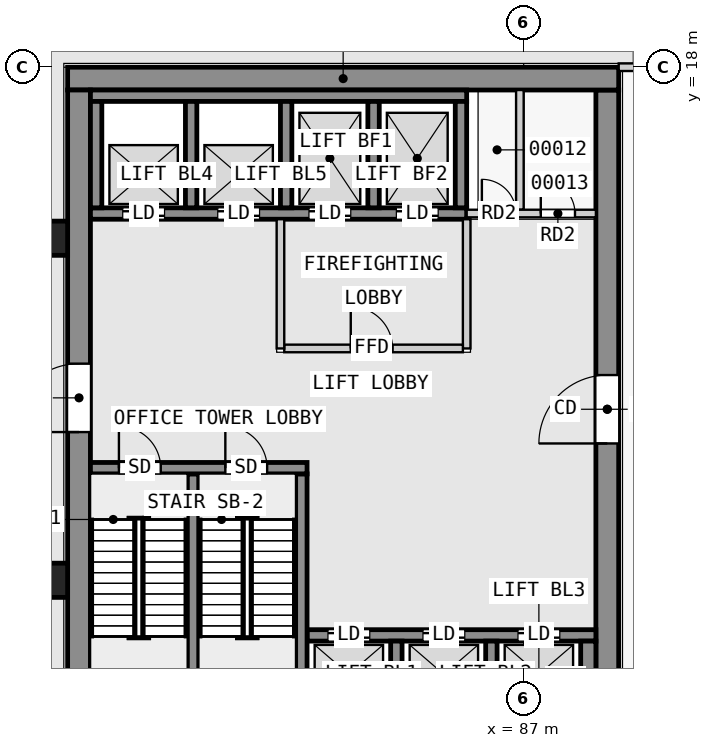
"""IFC4 building model, lengths in metres.
Left out: names, types, materials, properties, quantities, classifications, styles, units other than length and angle.
Written with IfcOpenShell. Run it as: python <this file> out.ifc"""

import sys

from ifc_helpers import new_model, si_unit, direction, frame, frame_2d, origin, origin_2d, place, context, subcontext, project, spatial, rectangle, extrude, element, fill, save


model = new_model("IFC4")
c1 = context("Model", 3, precision=1e-05, world=origin(), true_north=direction((0.0, 1.0)))
c2 = subcontext(c1, "Body", "Model", "MODEL_VIEW")
j1 = project(units=[si_unit("LENGTHUNIT", "METRE"), si_unit("PLANEANGLEUNIT", "RADIAN")], contexts=[c1])
p1 = place(None, origin())
s1 = spatial("IfcSite", under=j1, at=p1, CompositionType="ELEMENT")
p2 = place(p1, origin())
s2 = spatial("IfcBuilding", under=s1, at=p2, CompositionType="ELEMENT")
p3 = place(p2, origin())
s3 = spatial("IfcBuildingStorey", under=s2, at=p3, CompositionType="ELEMENT", Elevation=0.0)
for number, where, z_axis, x_axis in (
    (1, (74.55, 13.5, 0.0), (0.0, 0.0, 1.0), (1.0, 0.0, 0.0)),
    (2, (74.55, 4.5, 0.0), (0.0, 0.0, 1.0), (1.0, 0.0, 0.0)),
):
    element("IfcColumn", number, at=place(p3, frame(where, z_axis=z_axis, x_axis=x_axis)), inside=s3, PredefinedType="COLUMN", context=c2, shape_type="SweptSolid", body=[
        extrude(rectangle(XDim=0.9, YDim=0.9, at=origin_2d()), origin(), (0.0, 0.0, 1.0), 8.0),
    ])
p4 = place(p3, frame((75.0, 17.7, 0.0), z_axis=(0.0, 0.0, 1.0), x_axis=(1.0, 0.0, 0.0)))
e3 = element("IfcWall", 3, at=p4, inside=s3, PredefinedType="SHEAR", context=c2, shape_type="SweptSolid", body=[
    extrude(rectangle(XDim=14.5, YDim=0.6, at=frame_2d((7.25, 0.0))), origin(), (0.0, 0.0, 1.0), 7.65),
])
p5 = place(p3, frame((75.3, 0.6, 0.0), z_axis=(0.0, 0.0, 1.0), x_axis=(0.0, 1.0, 0.0)))
e4 = element("IfcWall", 4, at=p5, inside=s3, PredefinedType="SHEAR", context=c2, shape_type="SweptSolid", body=[
    extrude(rectangle(XDim=16.8, YDim=0.6, at=frame_2d((8.4, 0.0))), origin(), (0.0, 0.0, 1.0), 7.65),
])
p6 = place(p5, frame((7.8, 0.0, 0.0)))
e5 = element("IfcOpeningElement", 5, at=p6, cuts=e4, PredefinedType="OPENING", context=c2, shape_type="SweptSolid", body=[
    extrude(rectangle(XDim=1.8, YDim=2.1, at=frame_2d((0.9, 1.05))), frame((0.0, 0.31, 0.0), z_axis=(0.0, -1.0, 0.0), x_axis=(1.0, 0.0, 0.0)), (0.0, 0.0, 1.0), 0.62),
])
p7 = place(p3, frame((89.2, 0.6, 0.0), z_axis=(0.0, 0.0, 1.0), x_axis=(0.0, 1.0, 0.0)))
e6 = element("IfcWall", 6, at=p7, inside=s3, PredefinedType="SHEAR", context=c2, shape_type="SweptSolid", body=[
    extrude(rectangle(XDim=16.8, YDim=0.6, at=frame_2d((8.4, 0.0))), origin(), (0.0, 0.0, 1.0), 7.65),
])
p8 = place(p7, frame((7.5, 0.0, 0.0)))
e7 = element("IfcOpeningElement", 7, at=p8, cuts=e6, PredefinedType="OPENING", context=c2, shape_type="SweptSolid", body=[
    extrude(rectangle(XDim=1.8, YDim=2.1, at=frame_2d((0.9, 1.05))), frame((0.0, 0.31, 0.0), z_axis=(0.0, -1.0, 0.0), x_axis=(1.0, 0.0, 0.0)), (0.0, 0.0, 1.0), 0.62),
])
p9 = place(p3, frame((75.6, 7.45, 0.0), z_axis=(0.0, 0.0, 1.0), x_axis=(1.0, 0.0, 0.0)))
e8 = element("IfcWall", 8, at=p9, inside=s3, PredefinedType="SHEAR", context=c2, shape_type="SweptSolid", body=[
    extrude(rectangle(XDim=5.7, YDim=0.3, at=frame_2d((2.85, 0.0))), origin(), (0.0, 0.0, 1.0), 7.65),
])
p10 = place(p9, frame((0.75, 0.0, 0.0)))
e9 = element("IfcOpeningElement", 9, at=p10, cuts=e8, PredefinedType="OPENING", context=c2, shape_type="SweptSolid", body=[
    extrude(rectangle(XDim=1.1, YDim=2.1, at=frame_2d((0.55, 1.05))), frame((0.0, 0.16, 0.0), z_axis=(0.0, -1.0, 0.0), x_axis=(1.0, 0.0, 0.0)), (0.0, 0.0, 1.0), 0.32),
])
p11 = place(p9, frame((3.55, 0.0, 0.0)))
e10 = element("IfcOpeningElement", 10, at=p11, cuts=e8, PredefinedType="OPENING", context=c2, shape_type="SweptSolid", body=[
    extrude(rectangle(XDim=1.1, YDim=2.1, at=frame_2d((0.55, 1.05))), frame((0.0, 0.16, 0.0), z_axis=(0.0, -1.0, 0.0), x_axis=(1.0, 0.0, 0.0)), (0.0, 0.0, 1.0), 0.32),
])
for number, where, z_axis, x_axis in (
    (11, (78.3, 0.58, 0.0), (0.0, 0.0, 1.0), (0.0, 1.0, 0.0)),
    (12, (81.15, 0.58, 0.0), (0.0, 0.0, 1.0), (0.0, 1.0, 0.0)),
):
    element("IfcWall", number, at=place(p3, frame(where, z_axis=z_axis, x_axis=x_axis)), inside=s3, PredefinedType="SHEAR", context=c2, shape_type="SweptSolid", body=[
        extrude(rectangle(XDim=6.72, YDim=0.3, at=frame_2d((3.36, 0.0))), origin(), (0.0, 0.0, 1.0), 7.65),
    ])
for number, where, z_axis, x_axis in (
    (13, (83.65, 0.9, 0.0), (0.0, 0.0, 1.0), (0.0, 1.0, 0.0)),
    (14, (86.15, 0.9, 0.0), (0.0, 0.0, 1.0), (0.0, 1.0, 0.0)),
):
    element("IfcWall", number, at=place(p3, frame(where, z_axis=z_axis, x_axis=x_axis)), inside=s3, PredefinedType="SHEAR", context=c2, shape_type="SweptSolid", body=[
        extrude(rectangle(XDim=2.0, YDim=0.3, at=frame_2d((1.0, 0.0))), origin(), (0.0, 0.0, 1.0), 7.65),
    ])
p12 = place(p3, frame((88.7, 0.9, 0.0), z_axis=(0.0, 0.0, 1.0), x_axis=(0.0, 1.0, 0.0)))
e15 = element("IfcWall", 15, at=p12, inside=s3, PredefinedType="SHEAR", context=c2, shape_type="SweptSolid", body=[
    extrude(rectangle(XDim=2.0, YDim=0.4, at=frame_2d((1.0, 0.0))), origin(), (0.0, 0.0, 1.0), 7.65),
])
p13 = place(p3, frame((81.3, 3.05, 0.0), z_axis=(0.0, 0.0, 1.0), x_axis=(1.0, 0.0, 0.0)))
e16 = element("IfcWall", 16, at=p13, inside=s3, PredefinedType="SHEAR", context=c2, shape_type="SweptSolid", body=[
    extrude(rectangle(XDim=7.6, YDim=0.3, at=frame_2d((3.8, 0.0))), origin(), (0.0, 0.0, 1.0), 7.65),
])
p14 = place(p13, frame((0.55, 0.0, 0.0)))
e17 = element("IfcOpeningElement", 17, at=p14, cuts=e16, PredefinedType="OPENING", context=c2, shape_type="SweptSolid", body=[
    extrude(rectangle(XDim=1.1, YDim=2.1, at=frame_2d((0.55, 1.05))), frame((0.0, 0.16, 0.0), z_axis=(0.0, -1.0, 0.0), x_axis=(1.0, 0.0, 0.0)), (0.0, 0.0, 1.0), 0.32),
])
p15 = place(p13, frame((3.05, 0.0, 0.0)))
e18 = element("IfcOpeningElement", 18, at=p15, cuts=e16, PredefinedType="OPENING", context=c2, shape_type="SweptSolid", body=[
    extrude(rectangle(XDim=1.1, YDim=2.1, at=frame_2d((0.55, 1.05))), frame((0.0, 0.16, 0.0), z_axis=(0.0, -1.0, 0.0), x_axis=(1.0, 0.0, 0.0)), (0.0, 0.0, 1.0), 0.32),
])
p16 = place(p13, frame((5.55, 0.0, 0.0)))
e19 = element("IfcOpeningElement", 19, at=p16, cuts=e16, PredefinedType="OPENING", context=c2, shape_type="SweptSolid", body=[
    extrude(rectangle(XDim=1.1, YDim=2.1, at=frame_2d((0.55, 1.05))), frame((0.0, 0.16, 0.0), z_axis=(0.0, -1.0, 0.0), x_axis=(1.0, 0.0, 0.0)), (0.0, 0.0, 1.0), 0.32),
])
p17 = place(p3, frame((75.6, 17.25, 0.0), z_axis=(0.0, 0.0, 1.0), x_axis=(1.0, 0.0, 0.0)))
e20 = element("IfcWall", 20, at=p17, inside=s3, PredefinedType="SHEAR", context=c2, shape_type="SweptSolid", body=[
    extrude(rectangle(XDim=9.9, YDim=0.3, at=frame_2d((4.95, 0.0))), origin(), (0.0, 0.0, 1.0), 7.65),
])
p18 = place(p3, frame((75.6, 14.15, 0.0), z_axis=(0.0, 0.0, 1.0), x_axis=(1.0, 0.0, 0.0)))
e21 = element("IfcWall", 21, at=p18, inside=s3, PredefinedType="SHEAR", context=c2, shape_type="SweptSolid", body=[
    extrude(rectangle(XDim=9.9, YDim=0.3, at=frame_2d((4.95, 0.0))), origin(), (0.0, 0.0, 1.0), 7.65),
])
p19 = place(p18, frame((0.85, 0.0, 0.0)))
e22 = element("IfcOpeningElement", 22, at=p19, cuts=e21, PredefinedType="OPENING", context=c2, shape_type="SweptSolid", body=[
    extrude(rectangle(XDim=1.1, YDim=2.1, at=frame_2d((0.55, 1.05))), frame((0.0, 0.16, 0.0), z_axis=(0.0, -1.0, 0.0), x_axis=(1.0, 0.0, 0.0)), (0.0, 0.0, 1.0), 0.32),
])
p20 = place(p18, frame((3.35, 0.0, 0.0)))
e23 = element("IfcOpeningElement", 23, at=p20, cuts=e21, PredefinedType="OPENING", context=c2, shape_type="SweptSolid", body=[
    extrude(rectangle(XDim=1.1, YDim=2.1, at=frame_2d((0.55, 1.05))), frame((0.0, 0.16, 0.0), z_axis=(0.0, -1.0, 0.0), x_axis=(1.0, 0.0, 0.0)), (0.0, 0.0, 1.0), 0.32),
])
p21 = place(p18, frame((5.75, 0.0, 0.0)))
e24 = element("IfcOpeningElement", 24, at=p21, cuts=e21, PredefinedType="OPENING", context=c2, shape_type="SweptSolid", body=[
    extrude(rectangle(XDim=1.1, YDim=2.1, at=frame_2d((0.55, 1.05))), frame((0.0, 0.16, 0.0), z_axis=(0.0, -1.0, 0.0), x_axis=(1.0, 0.0, 0.0)), (0.0, 0.0, 1.0), 0.32),
])
p22 = place(p18, frame((8.05, 0.0, 0.0)))
e25 = element("IfcOpeningElement", 25, at=p22, cuts=e21, PredefinedType="OPENING", context=c2, shape_type="SweptSolid", body=[
    extrude(rectangle(XDim=1.1, YDim=2.1, at=frame_2d((0.55, 1.05))), frame((0.0, 0.16, 0.0), z_axis=(0.0, -1.0, 0.0), x_axis=(1.0, 0.0, 0.0)), (0.0, 0.0, 1.0), 0.32),
])
for number, where, z_axis, x_axis in (
    (26, (75.75, 14.3, 0.0), (0.0, 0.0, 1.0), (0.0, 1.0, 0.0)),
    (27, (78.25, 14.3, 0.0), (0.0, 0.0, 1.0), (0.0, 1.0, 0.0)),
    (28, (80.75, 14.3, 0.0), (0.0, 0.0, 1.0), (0.0, 1.0, 0.0)),
    (29, (83.05, 14.3, 0.0), (0.0, 0.0, 1.0), (0.0, 1.0, 0.0)),
    (30, (85.35, 14.3, 0.0), (0.0, 0.0, 1.0), (0.0, 1.0, 0.0)),
):
    element("IfcWall", number, at=place(p3, frame(where, z_axis=z_axis, x_axis=x_axis)), inside=s3, PredefinedType="SHEAR", context=c2, shape_type="SweptSolid", body=[
        extrude(rectangle(XDim=2.8, YDim=0.3, at=frame_2d((1.4, 0.0))), origin(), (0.0, 0.0, 1.0), 7.65),
    ])
p23 = place(p3, frame((80.6, 10.6, 0.0), z_axis=(0.0, 0.0, 1.0), x_axis=(0.0, 1.0, 0.0)))
e31 = element("IfcWall", 31, at=p23, inside=s3, PredefinedType="PARTITIONING", context=c2, shape_type="SweptSolid", body=[
    extrude(rectangle(XDim=3.4, YDim=0.2, at=frame_2d((1.7, 0.0))), origin(), (0.0, 0.0, 1.0), 7.65),
])
p24 = place(p3, frame((80.7, 10.6, 0.0), z_axis=(0.0, 0.0, 1.0), x_axis=(1.0, 0.0, 0.0)))
e32 = element("IfcWall", 32, at=p24, inside=s3, PredefinedType="PARTITIONING", context=c2, shape_type="SweptSolid", body=[
    extrude(rectangle(XDim=4.7, YDim=0.2, at=frame_2d((2.35, 0.0))), origin(), (0.0, 0.0, 1.0), 7.65),
])
p25 = place(p24, frame((1.75, 0.0, 0.0)))
e33 = element("IfcOpeningElement", 33, at=p25, cuts=e32, PredefinedType="OPENING", context=c2, shape_type="SweptSolid", body=[
    extrude(rectangle(XDim=1.1, YDim=2.1, at=frame_2d((0.55, 1.05))), frame((0.0, 0.11, 0.0), z_axis=(0.0, -1.0, 0.0), x_axis=(1.0, 0.0, 0.0)), (0.0, 0.0, 1.0), 0.22),
])
p26 = place(p3, frame((85.5, 10.6, 0.0), z_axis=(0.0, 0.0, 1.0), x_axis=(0.0, 1.0, 0.0)))
e34 = element("IfcWall", 34, at=p26, inside=s3, PredefinedType="PARTITIONING", context=c2, shape_type="SweptSolid", body=[
    extrude(rectangle(XDim=3.4, YDim=0.2, at=frame_2d((1.7, 0.0))), origin(), (0.0, 0.0, 1.0), 7.65),
])
p27 = place(p3, frame((85.5, 14.15, 0.0), z_axis=(0.0, 0.0, 1.0), x_axis=(1.0, 0.0, 0.0)))
e35 = element("IfcWall", 35, at=p27, inside=s3, PredefinedType="PARTITIONING", context=c2, shape_type="SweptSolid", body=[
    extrude(rectangle(XDim=3.4, YDim=0.2, at=frame_2d((1.7, 0.0))), origin(), (0.0, 0.0, 1.0), 7.65),
])
p28 = place(p27, frame((0.4, 0.0, 0.0)))
e36 = element("IfcOpeningElement", 36, at=p28, cuts=e35, PredefinedType="OPENING", context=c2, shape_type="SweptSolid", body=[
    extrude(rectangle(XDim=0.9, YDim=2.1, at=frame_2d((0.45, 1.05))), frame((0.0, 0.11, 0.0), z_axis=(0.0, -1.0, 0.0), x_axis=(1.0, 0.0, 0.0)), (0.0, 0.0, 1.0), 0.22),
])
p29 = place(p27, frame((1.95, 0.0, 0.0)))
e37 = element("IfcOpeningElement", 37, at=p29, cuts=e35, PredefinedType="OPENING", context=c2, shape_type="SweptSolid", body=[
    extrude(rectangle(XDim=0.9, YDim=2.1, at=frame_2d((0.45, 1.05))), frame((0.0, 0.11, 0.0), z_axis=(0.0, -1.0, 0.0), x_axis=(1.0, 0.0, 0.0)), (0.0, 0.0, 1.0), 0.22),
])
p30 = place(p3, frame((86.9, 14.25, 0.0), z_axis=(0.0, 0.0, 1.0), x_axis=(0.0, 1.0, 0.0)))
e38 = element("IfcWall", 38, at=p30, inside=s3, PredefinedType="PARTITIONING", context=c2, shape_type="SweptSolid", body=[
    extrude(rectangle(XDim=3.15, YDim=0.2, at=frame_2d((1.575, 0.0))), origin(), (0.0, 0.0, 1.0), 7.65),
])
p31 = place(p3, frame((90.0, 18.0, 0.0), z_axis=(0.0, 0.0, 1.0), x_axis=(-1.0, 0.0, 0.0)))
e39 = element("IfcWall", 39, at=p31, inside=s3, PredefinedType="PARTITIONING", context=c2, shape_type="SweptSolid", body=[
    extrude(rectangle(XDim=0.5, YDim=0.2, at=frame_2d((0.25, 0.0))), origin(), (0.0, 0.0, 1.0), 7.65),
])
p32 = place(p25, origin())
e40 = element("IfcDoor", 40, at=p32, inside=s3, OperationType="SINGLE_SWING_LEFT", PredefinedType="DOOR", context=c2, shape_type="SweptSolid", body=[
    extrude(rectangle(XDim=1.1, YDim=2.1, at=frame_2d((0.55, 1.05))), frame((0.0, 0.025, 0.0), z_axis=(0.0, -1.0, 0.0), x_axis=(1.0, 0.0, 0.0)), (0.0, 0.0, 1.0), 0.05),
])
fill(e33, e40)
p33 = place(p14, origin())
e41 = element("IfcDoor", 41, at=p33, inside=s3, OperationType="DOUBLE_DOOR_SLIDING", PredefinedType="DOOR", context=c2, shape_type="SweptSolid", body=[
    extrude(rectangle(XDim=1.1, YDim=2.1, at=frame_2d((0.55, 1.05))), frame((0.0, 0.025, 0.0), z_axis=(0.0, -1.0, 0.0), x_axis=(1.0, 0.0, 0.0)), (0.0, 0.0, 1.0), 0.05),
])
fill(e17, e41)
p34 = place(p15, origin())
e42 = element("IfcDoor", 42, at=p34, inside=s3, OperationType="DOUBLE_DOOR_SLIDING", PredefinedType="DOOR", context=c2, shape_type="SweptSolid", body=[
    extrude(rectangle(XDim=1.1, YDim=2.1, at=frame_2d((0.55, 1.05))), frame((0.0, 0.025, 0.0), z_axis=(0.0, -1.0, 0.0), x_axis=(1.0, 0.0, 0.0)), (0.0, 0.0, 1.0), 0.05),
])
fill(e18, e42)
p35 = place(p16, origin())
e43 = element("IfcDoor", 43, at=p35, inside=s3, OperationType="DOUBLE_DOOR_SLIDING", PredefinedType="DOOR", context=c2, shape_type="SweptSolid", body=[
    extrude(rectangle(XDim=1.1, YDim=2.1, at=frame_2d((0.55, 1.05))), frame((0.0, 0.025, 0.0), z_axis=(0.0, -1.0, 0.0), x_axis=(1.0, 0.0, 0.0)), (0.0, 0.0, 1.0), 0.05),
])
fill(e19, e43)
p36 = place(p19, origin())
e44 = element("IfcDoor", 44, at=p36, inside=s3, OperationType="DOUBLE_DOOR_SLIDING", PredefinedType="DOOR", context=c2, shape_type="SweptSolid", body=[
    extrude(rectangle(XDim=1.1, YDim=2.1, at=frame_2d((0.55, 1.05))), frame((0.0, 0.025, 0.0), z_axis=(0.0, -1.0, 0.0), x_axis=(1.0, 0.0, 0.0)), (0.0, 0.0, 1.0), 0.05),
])
fill(e22, e44)
p37 = place(p20, origin())
e45 = element("IfcDoor", 45, at=p37, inside=s3, OperationType="DOUBLE_DOOR_SLIDING", PredefinedType="DOOR", context=c2, shape_type="SweptSolid", body=[
    extrude(rectangle(XDim=1.1, YDim=2.1, at=frame_2d((0.55, 1.05))), frame((0.0, 0.025, 0.0), z_axis=(0.0, -1.0, 0.0), x_axis=(1.0, 0.0, 0.0)), (0.0, 0.0, 1.0), 0.05),
])
fill(e23, e45)
p38 = place(p21, origin())
e46 = element("IfcDoor", 46, at=p38, inside=s3, OperationType="DOUBLE_DOOR_SLIDING", PredefinedType="DOOR", context=c2, shape_type="SweptSolid", body=[
    extrude(rectangle(XDim=1.1, YDim=2.1, at=frame_2d((0.55, 1.05))), frame((0.0, 0.025, 0.0), z_axis=(0.0, -1.0, 0.0), x_axis=(1.0, 0.0, 0.0)), (0.0, 0.0, 1.0), 0.05),
])
fill(e24, e46)
p39 = place(p22, origin())
e47 = element("IfcDoor", 47, at=p39, inside=s3, OperationType="DOUBLE_DOOR_SLIDING", PredefinedType="DOOR", context=c2, shape_type="SweptSolid", body=[
    extrude(rectangle(XDim=1.1, YDim=2.1, at=frame_2d((0.55, 1.05))), frame((0.0, 0.025, 0.0), z_axis=(0.0, -1.0, 0.0), x_axis=(1.0, 0.0, 0.0)), (0.0, 0.0, 1.0), 0.05),
])
fill(e25, e47)
p40 = place(p10, origin())
e48 = element("IfcDoor", 48, at=p40, inside=s3, OperationType="SINGLE_SWING_RIGHT", PredefinedType="DOOR", context=c2, shape_type="SweptSolid", body=[
    extrude(rectangle(XDim=1.1, YDim=2.1, at=frame_2d((0.55, 1.05))), frame((0.0, 0.025, 0.0), z_axis=(0.0, -1.0, 0.0), x_axis=(1.0, 0.0, 0.0)), (0.0, 0.0, 1.0), 0.05),
])
fill(e9, e48)
p41 = place(p11, origin())
e49 = element("IfcDoor", 49, at=p41, inside=s3, OperationType="SINGLE_SWING_LEFT", PredefinedType="DOOR", context=c2, shape_type="SweptSolid", body=[
    extrude(rectangle(XDim=1.1, YDim=2.1, at=frame_2d((0.55, 1.05))), frame((0.0, 0.025, 0.0), z_axis=(0.0, -1.0, 0.0), x_axis=(1.0, 0.0, 0.0)), (0.0, 0.0, 1.0), 0.05),
])
fill(e10, e49)
p42 = place(p6, origin())
e50 = element("IfcDoor", 50, at=p42, inside=s3, OperationType="DOUBLE_DOOR_SINGLE_SWING", PredefinedType="DOOR", context=c2, shape_type="SweptSolid", body=[
    extrude(rectangle(XDim=1.8, YDim=2.1, at=frame_2d((0.9, 1.05))), frame((0.0, 0.025, 0.0), z_axis=(0.0, -1.0, 0.0), x_axis=(1.0, 0.0, 0.0)), (0.0, 0.0, 1.0), 0.05),
])
fill(e5, e50)
p43 = place(p8, origin())
e51 = element("IfcDoor", 51, at=p43, inside=s3, OperationType="DOUBLE_DOOR_SINGLE_SWING", PredefinedType="DOOR", context=c2, shape_type="SweptSolid", body=[
    extrude(rectangle(XDim=1.8, YDim=2.1, at=frame_2d((0.9, 1.05))), frame((0.0, 0.025, 0.0), z_axis=(0.0, -1.0, 0.0), x_axis=(1.0, 0.0, 0.0)), (0.0, 0.0, 1.0), 0.05),
])
fill(e7, e51)
p44 = place(p28, origin())
e52 = element("IfcDoor", 52, at=p44, inside=s3, OperationType="SINGLE_SWING_LEFT", PredefinedType="DOOR", context=c2, shape_type="SweptSolid", body=[
    extrude(rectangle(XDim=0.9, YDim=2.1, at=frame_2d((0.45, 1.05))), frame((0.0, 0.025, 0.0), z_axis=(0.0, -1.0, 0.0), x_axis=(1.0, 0.0, 0.0)), (0.0, 0.0, 1.0), 0.05),
])
fill(e36, e52)
p45 = place(p29, origin())
e53 = element("IfcDoor", 53, at=p45, inside=s3, OperationType="SINGLE_SWING_LEFT", PredefinedType="DOOR", context=c2, shape_type="SweptSolid", body=[
    extrude(rectangle(XDim=0.9, YDim=2.1, at=frame_2d((0.45, 1.05))), frame((0.0, 0.025, 0.0), z_axis=(0.0, -1.0, 0.0), x_axis=(1.0, 0.0, 0.0)), (0.0, 0.0, 1.0), 0.05),
])
fill(e37, e53)
save(model, sys.argv[1])
